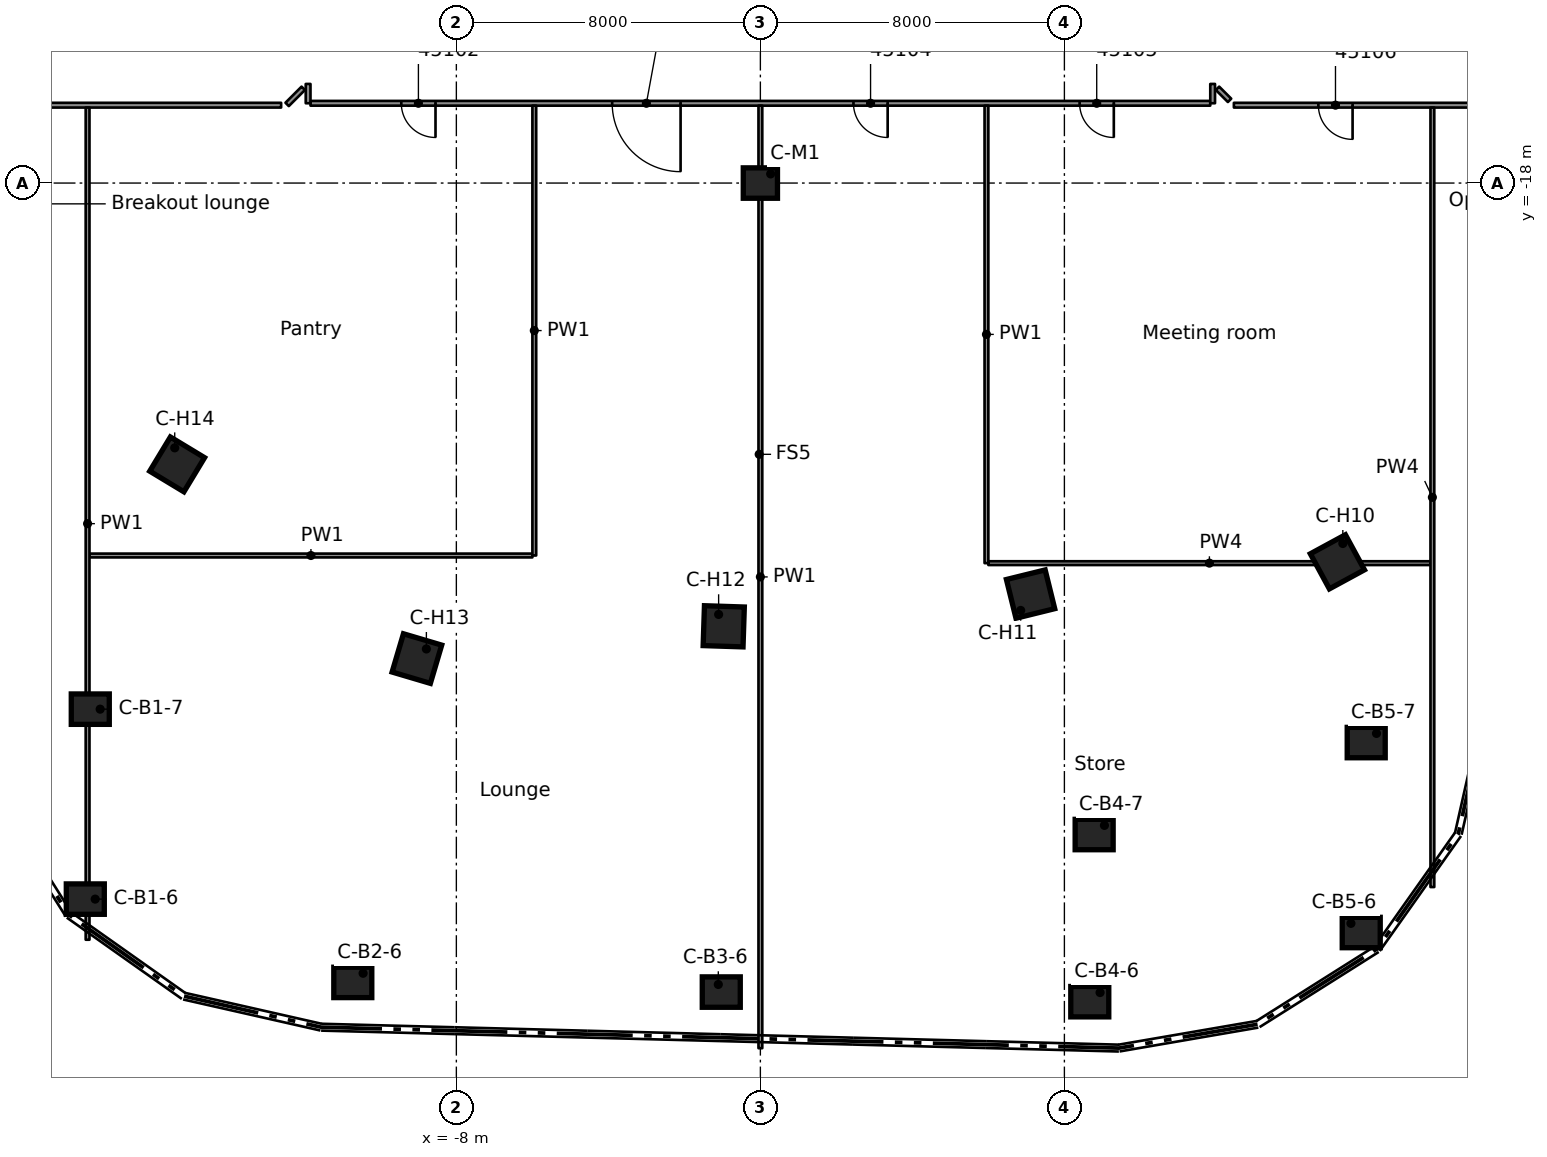
"""IFC4 building model, lengths in metres.
Left out: names, types, materials, properties, quantities, classifications, styles, units other than length and angle.
Written with IfcOpenShell. Run it as: python <this file> out.ifc"""

import sys

from ifc_helpers import new_model, si_unit, direction, frame, frame_2d, origin, origin_2d, place, context, subcontext, project, spatial, rectangle, extrude, element, fill, save


model = new_model("IFC4")
c1 = context("Model", 3, precision=1e-05, world=origin(), true_north=direction((0.0, 1.0)))
c2 = subcontext(c1, "Body", "Model", "MODEL_VIEW")
j1 = project(units=[si_unit("LENGTHUNIT", "METRE"), si_unit("PLANEANGLEUNIT", "RADIAN")], contexts=[c1])
p1 = place(None, origin())
s1 = spatial("IfcSite", under=j1, at=p1, CompositionType="ELEMENT")
p2 = place(p1, origin())
s2 = spatial("IfcBuilding", under=s1, at=p2, CompositionType="ELEMENT")
p3 = place(p2, frame((0.0, 0.0, 221.0)))
s3 = spatial("IfcBuildingStorey", under=s2, at=p3, CompositionType="ELEMENT", Elevation=221.0)
for number, where, z_axis, x_axis in (
    (1, (-17.764, -36.841, 0.0), (0.0, 0.0, 1.0), (1.0, 0.0, 0.0)),
    (2, (-17.633, -31.843, 0.0), (0.0, 0.0, 1.0), (1.0, 0.0, 0.0)),
    (3, (-10.725, -39.033, 0.0), (0.0, 0.0, 1.0), (1.0, 0.0, 0.0)),
    (4, (-1.029, -39.287, 0.0), (0.0, 0.0, 1.0), (1.0, 0.0, 0.0)),
    (5, (8.668, -39.54, 0.0), (0.0, 0.0, 1.0), (1.0, 0.0, 0.0)),
    (6, (8.783, -35.142, 0.0), (0.0, 0.0, 1.0), (1.0, 0.0, 0.0)),
    (7, (15.811, -37.72, 0.0), (0.0, 0.0, 1.0), (1.0, 0.0, 0.0)),
    (8, (15.942, -32.722, 0.0), (0.0, 0.0, 1.0), (1.0, 0.0, 0.0)),
):
    element("IfcColumn", number, at=place(p3, frame(where, z_axis=z_axis, x_axis=x_axis)), inside=s3, PredefinedType="COLUMN", context=c2, shape_type="SweptSolid", body=[
        extrude(rectangle(XDim=1.0, YDim=0.8, at=origin_2d()), origin(), (0.0, 0.0, 1.0), 3.5),
    ])
for number, where, z_axis, x_axis in (
    (9, (15.184, -27.966, 0.0), (0.0, 0.0, 1.0), (0.477, -0.879, 0.0)),
    (10, (7.11, -28.815, 0.0), (0.0, 0.0, 1.0), (0.24, -0.971, 0.0)),
    (11, (-0.964, -29.663, 0.0), (0.0, 0.0, 1.0), (-0.032, -0.999, 0.0)),
    (12, (-9.038, -30.512, 0.0), (0.0, 0.0, 1.0), (-0.284, -0.959, 0.0)),
    (13, (-15.347, -25.403, 0.0), (0.0, 0.0, 1.0), (-0.517, -0.856, 0.0)),
):
    element("IfcColumn", number, at=place(p3, frame(where, z_axis=z_axis, x_axis=x_axis)), inside=s3, PredefinedType="COLUMN", context=c2, shape_type="SweptSolid", body=[
        extrude(rectangle(XDim=1.05, YDim=1.05, at=origin_2d()), origin(), (0.0, 0.0, 1.0), 3.5),
    ])
p4 = place(p3, frame((0.0, -18.0, 0.0), z_axis=(0.0, 0.0, 1.0), x_axis=(1.0, 0.0, 0.0)))
e14 = element("IfcColumn", 14, at=p4, inside=s3, PredefinedType="COLUMN", context=c2, shape_type="SweptSolid", body=[
    extrude(rectangle(XDim=0.9, YDim=0.8, at=origin_2d()), origin(), (0.0, 0.0, 1.0), 3.5),
])
p5 = place(p3, frame((12.029, -15.507, 0.0), z_axis=(0.0, 0.0, 1.0), x_axis=(0.707106781187, -0.707106781187, 0.0)))
e15 = element("IfcWall", 15, at=p5, inside=s3, PredefinedType="PARTITIONING", context=c2, shape_type="SweptSolid", body=[
    extrude(rectangle(XDim=0.448, YDim=0.125, at=frame_2d((0.224, 0.0))), origin(), (0.0, 0.0, 1.0), 3.06),
])
p6 = place(p3, frame((5.999, -28.001, 0.0), z_axis=(0.0, 0.0, 1.0), x_axis=(1.0, 0.0, 0.0)))
e16 = element("IfcWall", 16, at=p6, inside=s3, PredefinedType="PARTITIONING", context=c2, shape_type="SweptSolid", body=[
    extrude(rectangle(XDim=11.634, YDim=0.1, at=frame_2d((5.817, 0.0))), origin(), (0.0, 0.0, 1.0), 2.449),
])
p7 = place(p3, frame((-17.654, -27.8, 0.0), z_axis=(0.0, 0.0, 1.0), x_axis=(1.0, 0.0, 0.0)))
e17 = element("IfcWall", 17, at=p7, inside=s3, PredefinedType="PARTITIONING", context=c2, shape_type="SweptSolid", body=[
    extrude(rectangle(XDim=11.655, YDim=0.1, at=frame_2d((5.828, 0.0))), origin(), (0.0, 0.0, 1.0), 3.06),
])
p8 = place(p3, frame((-12.611, -15.951, 0.0), z_axis=(0.0, 0.0, 1.0), x_axis=(-1.0, 0.0, 0.0)))
e18 = element("IfcWall", 18, at=p8, inside=s3, PredefinedType="PARTITIONING", context=c2, shape_type="SweptSolid", body=[
    extrude(rectangle(XDim=10.276, YDim=0.125, at=frame_2d((5.138, 0.0))), origin(), (0.0, 0.0, 1.0), 3.06),
])
p9 = place(p8, frame((7.193, 0.0, 0.0)))
e19 = element("IfcOpeningElement", 19, at=p9, cuts=e18, PredefinedType="OPENING", context=c2, shape_type="SweptSolid", body=[
    extrude(rectangle(XDim=1.1, YDim=2.1, at=frame_2d((0.55, 1.05))), frame((0.0, 0.073, 0.0), z_axis=(0.0, -1.0, 0.0), x_axis=(1.0, 0.0, 0.0)), (0.0, 0.0, 1.0), 0.145),
])
p10 = place(p3, frame((22.845, -15.951, 0.0), z_axis=(0.0, 0.0, 1.0), x_axis=(-1.0, 0.0, 0.0)))
e20 = element("IfcWall", 20, at=p10, inside=s3, PredefinedType="PARTITIONING", context=c2, shape_type="SweptSolid", body=[
    extrude(rectangle(XDim=10.385, YDim=0.125, at=frame_2d((5.192, 0.0))), origin(), (0.0, 0.0, 1.0), 3.06),
])
p11 = place(p10, frame((7.261, 0.0, 0.0)))
e21 = element("IfcOpeningElement", 21, at=p11, cuts=e20, PredefinedType="OPENING", context=c2, shape_type="SweptSolid", body=[
    extrude(rectangle(XDim=0.9, YDim=2.1, at=frame_2d((0.45, 1.05))), frame((0.0, 0.073, 0.0), z_axis=(0.0, -1.0, 0.0), x_axis=(1.0, 0.0, 0.0)), (0.0, 0.0, 1.0), 0.145),
])
p12 = place(p10, frame((2.038, 0.0, 0.0)))
e22 = element("IfcOpeningElement", 22, at=p12, cuts=e20, PredefinedType="OPENING", context=c2, shape_type="SweptSolid", body=[
    extrude(rectangle(XDim=1.1, YDim=2.1, at=frame_2d((0.55, 1.05))), frame((0.0, 0.073, 0.0), z_axis=(0.0, -1.0, 0.0), x_axis=(1.0, 0.0, 0.0)), (0.0, 0.0, 1.0), 0.145),
])
p13 = place(p3, frame((11.838, -15.901, 0.0), z_axis=(0.0, 0.0, 1.0), x_axis=(-1.0, 0.0, 0.0)))
e23 = element("IfcWall", 23, at=p13, inside=s3, PredefinedType="PARTITIONING", context=c2, shape_type="SweptSolid", body=[
    extrude(rectangle(XDim=23.676, YDim=0.125, at=frame_2d((11.838, 0.0))), origin(), (0.0, 0.0, 1.0), 3.06),
])
p14 = place(p13, frame((20.386, 0.0, 0.0)))
e24 = element("IfcOpeningElement", 24, at=p14, cuts=e23, PredefinedType="OPENING", context=c2, shape_type="SweptSolid", body=[
    extrude(rectangle(XDim=0.9, YDim=2.1, at=frame_2d((0.45, 1.05))), frame((0.0, 0.073, 0.0), z_axis=(0.0, -1.0, 0.0), x_axis=(1.0, 0.0, 0.0)), (0.0, 0.0, 1.0), 0.145),
])
p15 = place(p13, frame((13.938, 0.0, 0.0)))
e25 = element("IfcOpeningElement", 25, at=p15, cuts=e23, PredefinedType="OPENING", context=c2, shape_type="SweptSolid", body=[
    extrude(rectangle(XDim=1.8, YDim=2.1, at=frame_2d((0.9, 1.05))), frame((0.0, 0.073, 0.0), z_axis=(0.0, -1.0, 0.0), x_axis=(1.0, 0.0, 0.0)), (0.0, 0.0, 1.0), 0.145),
])
p16 = place(p13, frame((8.489, 0.0, 0.0)))
e26 = element("IfcOpeningElement", 26, at=p16, cuts=e23, PredefinedType="OPENING", context=c2, shape_type="SweptSolid", body=[
    extrude(rectangle(XDim=0.9, YDim=2.1, at=frame_2d((0.45, 1.05))), frame((0.0, 0.073, 0.0), z_axis=(0.0, -1.0, 0.0), x_axis=(1.0, 0.0, 0.0)), (0.0, 0.0, 1.0), 0.145),
])
p17 = place(p13, frame((2.538, 0.0, 0.0)))
e27 = element("IfcOpeningElement", 27, at=p17, cuts=e23, PredefinedType="OPENING", context=c2, shape_type="SweptSolid", body=[
    extrude(rectangle(XDim=0.9, YDim=2.1, at=frame_2d((0.45, 1.05))), frame((0.0, 0.073, 0.0), z_axis=(0.0, -1.0, 0.0), x_axis=(1.0, 0.0, 0.0)), (0.0, 0.0, 1.0), 0.145),
])
p18 = place(p3, frame((-12.453, -15.931, 0.0), z_axis=(0.0, 0.0, 1.0), x_axis=(0.707106781187, 0.707106781187, 0.0)))
e28 = element("IfcWall", 28, at=p18, inside=s3, PredefinedType="PARTITIONING", context=c2, shape_type="SweptSolid", body=[
    extrude(rectangle(XDim=0.599, YDim=0.125, at=frame_2d((0.3, 0.0))), origin(), (0.0, 0.0, 1.0), 3.06),
])
p19 = place(p3, frame((17.683, -36.524, 0.0), z_axis=(0.0, 0.0, 1.0), x_axis=(0.0, 1.0, 0.0)))
e29 = element("IfcWall", 29, at=p19, inside=s3, PredefinedType="PARTITIONING", context=c2, shape_type="SweptSolid", body=[
    extrude(rectangle(XDim=20.51, YDim=0.1, at=frame_2d((10.255, 0.0))), origin(), (0.0, 0.0, 1.0), 2.449),
])
p20 = place(p3, frame((11.901, -15.9, 0.0), z_axis=(0.0, 0.0, 1.0), x_axis=(0.0, 1.0, 0.0)))
e30 = element("IfcWall", 30, at=p20, inside=s3, PredefinedType="PARTITIONING", context=c2, shape_type="SweptSolid", body=[
    extrude(rectangle(XDim=0.508, YDim=0.125, at=frame_2d((0.254, 0.0))), origin(), (0.0, 0.0, 1.0), 3.06),
])
p21 = place(p3, frame((5.949, -28.001, 0.0), z_axis=(0.0, 0.0, 1.0), x_axis=(0.0, 1.0, 0.0)))
e31 = element("IfcWall", 31, at=p21, inside=s3, PredefinedType="PARTITIONING", context=c2, shape_type="SweptSolid", body=[
    extrude(rectangle(XDim=12.038, YDim=0.1, at=frame_2d((6.019, 0.0))), origin(), (0.0, 0.0, 1.0), 3.06),
])
p22 = place(p3, frame((0.0, -40.764, 0.0), z_axis=(0.0, 0.0, 1.0), x_axis=(0.0, 1.0, 0.0)))
e32 = element("IfcWall", 32, at=p22, inside=s3, PredefinedType="PARTITIONING", context=c2, shape_type="SweptSolid", body=[
    extrude(rectangle(XDim=24.801, YDim=0.1, at=frame_2d((12.4, 0.0))), origin(), (0.0, 0.0, 1.0), 3.06),
])
p23 = place(p3, frame((-5.949, -27.8, 0.0), z_axis=(0.0, 0.0, 1.0), x_axis=(0.0, 1.0, 0.0)))
e33 = element("IfcWall", 33, at=p23, inside=s3, PredefinedType="PARTITIONING", context=c2, shape_type="SweptSolid", body=[
    extrude(rectangle(XDim=11.837, YDim=0.1, at=frame_2d((5.918, 0.0))), origin(), (0.0, 0.0, 1.0), 3.06),
])
p24 = place(p3, frame((-11.901, -15.9, 0.0), z_axis=(0.0, 0.0, 1.0), x_axis=(0.0, 1.0, 0.0)))
e34 = element("IfcWall", 34, at=p24, inside=s3, PredefinedType="PARTITIONING", context=c2, shape_type="SweptSolid", body=[
    extrude(rectangle(XDim=0.508, YDim=0.125, at=frame_2d((0.254, 0.0))), origin(), (0.0, 0.0, 1.0), 3.06),
])
p25 = place(p3, frame((-17.704, -37.91, 0.0), z_axis=(0.0, 0.0, 1.0), x_axis=(0.0, 1.0, 0.0)))
e35 = element("IfcWall", 35, at=p25, inside=s3, PredefinedType="PARTITIONING", context=c2, shape_type="SweptSolid", body=[
    extrude(rectangle(XDim=21.896, YDim=0.1, at=frame_2d((10.948, 0.0))), origin(), (0.0, 0.0, 1.0), 3.06),
])
p26 = place(p14, origin())
e36 = element("IfcDoor", 36, at=p26, inside=s3, OperationType="SINGLE_SWING_RIGHT", PredefinedType="DOOR", context=c2, shape_type="SweptSolid", body=[
    extrude(rectangle(XDim=0.9, YDim=2.1, at=frame_2d((0.45, 1.05))), frame((0.0, 0.025, 0.0), z_axis=(0.0, -1.0, 0.0), x_axis=(1.0, 0.0, 0.0)), (0.0, 0.0, 1.0), 0.05),
])
fill(e24, e36)
p27 = place(p15, origin())
e37 = element("IfcDoor", 37, at=p27, inside=s3, OperationType="DOUBLE_DOOR_SINGLE_SWING", PredefinedType="DOOR", context=c2, shape_type="SweptSolid", body=[
    extrude(rectangle(XDim=1.8, YDim=2.1, at=frame_2d((0.9, 1.05))), frame((0.0, 0.025, 0.0), z_axis=(0.0, -1.0, 0.0), x_axis=(1.0, 0.0, 0.0)), (0.0, 0.0, 1.0), 0.05),
])
fill(e25, e37)
p28 = place(p16, origin())
e38 = element("IfcDoor", 38, at=p28, inside=s3, OperationType="SINGLE_SWING_LEFT", PredefinedType="DOOR", context=c2, shape_type="SweptSolid", body=[
    extrude(rectangle(XDim=0.9, YDim=2.1, at=frame_2d((0.45, 1.05))), frame((0.0, 0.025, 0.0), z_axis=(0.0, -1.0, 0.0), x_axis=(1.0, 0.0, 0.0)), (0.0, 0.0, 1.0), 0.05),
])
fill(e26, e38)
p29 = place(p17, origin())
e39 = element("IfcDoor", 39, at=p29, inside=s3, OperationType="SINGLE_SWING_LEFT", PredefinedType="DOOR", context=c2, shape_type="SweptSolid", body=[
    extrude(rectangle(XDim=0.9, YDim=2.1, at=frame_2d((0.45, 1.05))), frame((0.0, 0.025, 0.0), z_axis=(0.0, -1.0, 0.0), x_axis=(1.0, 0.0, 0.0)), (0.0, 0.0, 1.0), 0.05),
])
fill(e27, e39)
p30 = place(p11, origin())
e40 = element("IfcDoor", 40, at=p30, inside=s3, OperationType="SINGLE_SWING_RIGHT", PredefinedType="DOOR", context=c2, shape_type="SweptSolid", body=[
    extrude(rectangle(XDim=0.9, YDim=2.1, at=frame_2d((0.45, 1.05))), frame((0.0, 0.025, 0.0), z_axis=(0.0, -1.0, 0.0), x_axis=(1.0, 0.0, 0.0)), (0.0, 0.0, 1.0), 0.05),
])
fill(e21, e40)
save(model, sys.argv[1])
